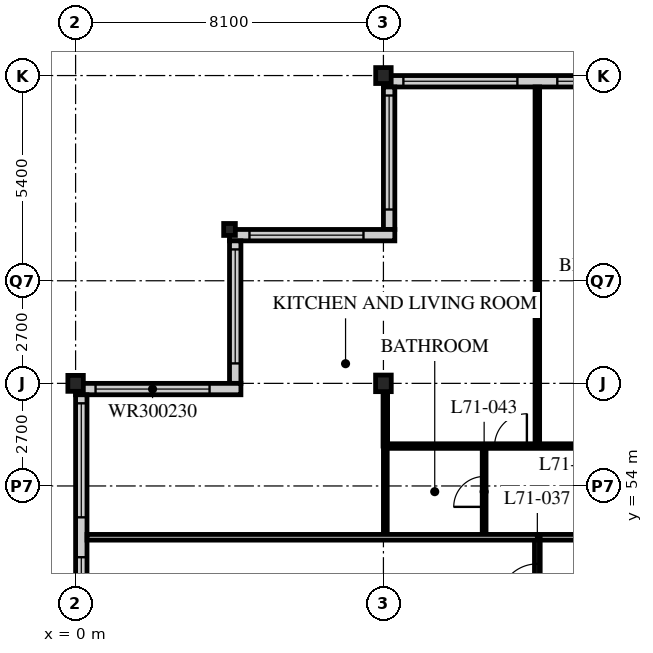
"""IFC4 building model, lengths in metres.
Left out: names, types, materials, properties, quantities, classifications, styles, units other than length and angle.
Written with IfcOpenShell. Run it as: python <this file> out.ifc"""

import sys

from ifc_helpers import new_model, si_unit, direction, frame, frame_2d, origin, origin_2d, place, context, subcontext, project, spatial, rectangle, i_section, extrude, element, fill, save


model = new_model("IFC4")
c1 = context("Model", 3, precision=1e-05, world=origin(), true_north=direction((0.0, 1.0)))
c2 = subcontext(c1, "Body", "Model", "MODEL_VIEW")
j1 = project(units=[si_unit("LENGTHUNIT", "METRE"), si_unit("PLANEANGLEUNIT", "RADIAN")], contexts=[c1])
p1 = place(None, origin())
s1 = spatial("IfcSite", under=j1, at=p1, CompositionType="ELEMENT")
p2 = place(p1, origin())
s2 = spatial("IfcBuilding", under=s1, at=p2, CompositionType="ELEMENT")
p3 = place(p2, frame((0.0, 0.0, 277.5)))
s3 = spatial("IfcBuildingStorey", under=s2, at=p3, CompositionType="ELEMENT", Elevation=277.5)
p4 = place(p3, frame((0.0, 56.7, 0.0), z_axis=(0.0, 0.0, 1.0), x_axis=(1.0, 0.0, 0.0)))
e1 = element("IfcColumn", 1, at=p4, inside=s3, PredefinedType="COLUMN", context=c2, shape_type="SweptSolid", body=[
    extrude(i_section(OverallWidth=0.407, OverallDepth=0.419, WebThickness=0.031, FlangeThickness=0.049, FilletRadius=0.015, at=origin_2d()), origin(), (0.0, 0.0, 1.0), 3.9),
])
p5 = place(p3, frame((4.05, 60.75, 0.0), z_axis=(0.0, 0.0, 1.0), x_axis=(1.0, 0.0, 0.0)))
e2 = element("IfcColumn", 2, at=p5, inside=s3, PredefinedType="COLUMN", context=c2, shape_type="SweptSolid", body=[
    extrude(i_section(OverallWidth=0.307, OverallDepth=0.314, WebThickness=0.012, FlangeThickness=0.019, FilletRadius=0.015, at=origin_2d()), origin(), (0.0, 0.0, 1.0), 3.9),
])
p6 = place(p3, frame((8.1, 56.7, 0.0), z_axis=(0.0, 0.0, 1.0), x_axis=(1.0, 0.0, 0.0)))
e3 = element("IfcColumn", 3, at=p6, inside=s3, PredefinedType="COLUMN", context=c2, shape_type="SweptSolid", body=[
    extrude(i_section(OverallWidth=0.412, OverallDepth=0.437, WebThickness=0.036, FlangeThickness=0.058, FilletRadius=0.015, at=origin_2d()), origin(), (0.0, 0.0, 1.0), 3.9),
])
p7 = place(p3, frame((8.1, 64.8, 0.0), z_axis=(0.0, 0.0, 1.0), x_axis=(1.0, 0.0, 0.0)))
e4 = element("IfcColumn", 4, at=p7, inside=s3, PredefinedType="COLUMN", context=c2, shape_type="SweptSolid", body=[
    extrude(i_section(OverallWidth=0.407, OverallDepth=0.419, WebThickness=0.031, FlangeThickness=0.049, FilletRadius=0.015, at=origin_2d()), origin(), (0.0, 0.0, 1.0), 3.9),
])
p8 = place(p3, frame((48.3, 64.65, 0.0), z_axis=(0.0, 0.0, 1.0), x_axis=(-1.0, 0.0, 0.0)))
e5 = element("IfcWall", 5, at=p8, inside=s3, PredefinedType="SOLIDWALL", context=c2, shape_type="SweptSolid", body=[
    extrude(rectangle(XDim=40.2, YDim=0.3, at=frame_2d((20.1, 0.0))), origin(), (0.0, 0.0, 1.0), 3.69),
])
p9 = place(p8, frame((0.225, 0.0, 0.6)))
e6 = element("IfcOpeningElement", 6, at=p9, cuts=e5, PredefinedType="OPENING", context=c2, shape_type="SweptSolid", body=[
    extrude(rectangle(XDim=3.0, YDim=2.4, at=frame_2d((1.5, 1.2))), frame((0.0, 0.16, 0.0), z_axis=(0.0, -1.0, 0.0), x_axis=(1.0, 0.0, 0.0)), (0.0, 0.0, 1.0), 0.32),
])
p10 = place(p8, frame((4.275, 0.0, 0.6)))
e7 = element("IfcOpeningElement", 7, at=p10, cuts=e5, PredefinedType="OPENING", context=c2, shape_type="SweptSolid", body=[
    extrude(rectangle(XDim=3.0, YDim=2.4, at=frame_2d((1.5, 1.2))), frame((0.0, 0.16, 0.0), z_axis=(0.0, -1.0, 0.0), x_axis=(1.0, 0.0, 0.0)), (0.0, 0.0, 1.0), 0.32),
])
p11 = place(p8, frame((8.325, 0.0, 0.6)))
e8 = element("IfcOpeningElement", 8, at=p11, cuts=e5, PredefinedType="OPENING", context=c2, shape_type="SweptSolid", body=[
    extrude(rectangle(XDim=3.0, YDim=2.4, at=frame_2d((1.5, 1.2))), frame((0.0, 0.16, 0.0), z_axis=(0.0, -1.0, 0.0), x_axis=(1.0, 0.0, 0.0)), (0.0, 0.0, 1.0), 0.32),
])
p12 = place(p8, frame((12.375, 0.0, 0.6)))
e9 = element("IfcOpeningElement", 9, at=p12, cuts=e5, PredefinedType="OPENING", context=c2, shape_type="SweptSolid", body=[
    extrude(rectangle(XDim=3.0, YDim=2.4, at=frame_2d((1.5, 1.2))), frame((0.0, 0.16, 0.0), z_axis=(0.0, -1.0, 0.0), x_axis=(1.0, 0.0, 0.0)), (0.0, 0.0, 1.0), 0.32),
])
p13 = place(p8, frame((16.425, 0.0, 0.6)))
e10 = element("IfcOpeningElement", 10, at=p13, cuts=e5, PredefinedType="OPENING", context=c2, shape_type="SweptSolid", body=[
    extrude(rectangle(XDim=3.0, YDim=2.4, at=frame_2d((1.5, 1.2))), frame((0.0, 0.16, 0.0), z_axis=(0.0, -1.0, 0.0), x_axis=(1.0, 0.0, 0.0)), (0.0, 0.0, 1.0), 0.32),
])
p14 = place(p8, frame((20.475, 0.0, 0.6)))
e11 = element("IfcOpeningElement", 11, at=p14, cuts=e5, PredefinedType="OPENING", context=c2, shape_type="SweptSolid", body=[
    extrude(rectangle(XDim=3.0, YDim=2.4, at=frame_2d((1.5, 1.2))), frame((0.0, 0.16, 0.0), z_axis=(0.0, -1.0, 0.0), x_axis=(1.0, 0.0, 0.0)), (0.0, 0.0, 1.0), 0.32),
])
p15 = place(p8, frame((24.525, 0.0, 0.6)))
e12 = element("IfcOpeningElement", 12, at=p15, cuts=e5, PredefinedType="OPENING", context=c2, shape_type="SweptSolid", body=[
    extrude(rectangle(XDim=3.0, YDim=2.4, at=frame_2d((1.5, 1.2))), frame((0.0, 0.16, 0.0), z_axis=(0.0, -1.0, 0.0), x_axis=(1.0, 0.0, 0.0)), (0.0, 0.0, 1.0), 0.32),
])
p16 = place(p8, frame((28.575, 0.0, 0.6)))
e13 = element("IfcOpeningElement", 13, at=p16, cuts=e5, PredefinedType="OPENING", context=c2, shape_type="SweptSolid", body=[
    extrude(rectangle(XDim=3.0, YDim=2.4, at=frame_2d((1.5, 1.2))), frame((0.0, 0.16, 0.0), z_axis=(0.0, -1.0, 0.0), x_axis=(1.0, 0.0, 0.0)), (0.0, 0.0, 1.0), 0.32),
])
p17 = place(p8, frame((32.625, 0.0, 0.6)))
e14 = element("IfcOpeningElement", 14, at=p17, cuts=e5, PredefinedType="OPENING", context=c2, shape_type="SweptSolid", body=[
    extrude(rectangle(XDim=3.0, YDim=2.4, at=frame_2d((1.5, 1.2))), frame((0.0, 0.16, 0.0), z_axis=(0.0, -1.0, 0.0), x_axis=(1.0, 0.0, 0.0)), (0.0, 0.0, 1.0), 0.32),
])
p18 = place(p8, frame((36.675, 0.0, 0.6)))
e15 = element("IfcOpeningElement", 15, at=p18, cuts=e5, PredefinedType="OPENING", context=c2, shape_type="SweptSolid", body=[
    extrude(rectangle(XDim=3.0, YDim=2.4, at=frame_2d((1.5, 1.2))), frame((0.0, 0.16, 0.0), z_axis=(0.0, -1.0, 0.0), x_axis=(1.0, 0.0, 0.0)), (0.0, 0.0, 1.0), 0.32),
])
p19 = place(p3, frame((8.25, 64.5, 0.0), z_axis=(0.0, 0.0, 1.0), x_axis=(0.0, -1.0, 0.0)))
e16 = element("IfcWall", 16, at=p19, inside=s3, PredefinedType="SOLIDWALL", context=c2, shape_type="SweptSolid", body=[
    extrude(rectangle(XDim=3.75, YDim=0.3, at=frame_2d((1.875, 0.0))), origin(), (0.0, 0.0, 1.0), 3.69),
])
p20 = place(p19, frame((0.225, 0.0, 0.6)))
e17 = element("IfcOpeningElement", 17, at=p20, cuts=e16, PredefinedType="OPENING", context=c2, shape_type="SweptSolid", body=[
    extrude(rectangle(XDim=3.0, YDim=2.3, at=frame_2d((1.5, 1.15))), frame((0.0, 0.16, 0.0), z_axis=(0.0, -1.0, 0.0), x_axis=(1.0, 0.0, 0.0)), (0.0, 0.0, 1.0), 0.32),
])
p21 = place(p3, frame((8.4, 60.6, 0.0), z_axis=(0.0, 0.0, 1.0), x_axis=(-1.0, 0.0, 0.0)))
e18 = element("IfcWall", 18, at=p21, inside=s3, PredefinedType="SOLIDWALL", context=c2, shape_type="SweptSolid", body=[
    extrude(rectangle(XDim=4.35, YDim=0.3, at=frame_2d((2.175, 0.0))), origin(), (0.0, 0.0, 1.0), 3.69),
])
p22 = place(p21, frame((0.825, 0.0, 0.6)))
e19 = element("IfcOpeningElement", 19, at=p22, cuts=e18, PredefinedType="OPENING", context=c2, shape_type="SweptSolid", body=[
    extrude(rectangle(XDim=3.0, YDim=2.3, at=frame_2d((1.5, 1.15))), frame((0.0, 0.16, 0.0), z_axis=(0.0, -1.0, 0.0), x_axis=(1.0, 0.0, 0.0)), (0.0, 0.0, 1.0), 0.32),
])
p23 = place(p3, frame((4.2, 60.45, 0.0), z_axis=(0.0, 0.0, 1.0), x_axis=(0.0, -1.0, 0.0)))
e20 = element("IfcWall", 20, at=p23, inside=s3, PredefinedType="SOLIDWALL", context=c2, shape_type="SweptSolid", body=[
    extrude(rectangle(XDim=3.75, YDim=0.3, at=frame_2d((1.875, 0.0))), origin(), (0.0, 0.0, 1.0), 3.69),
])
p24 = place(p23, frame((0.225, 0.0, 0.6)))
e21 = element("IfcOpeningElement", 21, at=p24, cuts=e20, PredefinedType="OPENING", context=c2, shape_type="SweptSolid", body=[
    extrude(rectangle(XDim=3.0, YDim=2.3, at=frame_2d((1.5, 1.15))), frame((0.0, 0.16, 0.0), z_axis=(0.0, -1.0, 0.0), x_axis=(1.0, 0.0, 0.0)), (0.0, 0.0, 1.0), 0.32),
])
p25 = place(p3, frame((4.35, 56.55, 0.0), z_axis=(0.0, 0.0, 1.0), x_axis=(-1.0, 0.0, 0.0)))
e22 = element("IfcWall", 22, at=p25, inside=s3, PredefinedType="SOLIDWALL", context=c2, shape_type="SweptSolid", body=[
    extrude(rectangle(XDim=4.35, YDim=0.3, at=frame_2d((2.175, 0.0))), origin(), (0.0, 0.0, 1.0), 3.69),
])
p26 = place(p25, frame((0.825, 0.0, 0.6)))
e23 = element("IfcOpeningElement", 23, at=p26, cuts=e22, PredefinedType="OPENING", context=c2, shape_type="SweptSolid", body=[
    extrude(rectangle(XDim=3.0, YDim=2.3, at=frame_2d((1.5, 1.15))), frame((0.0, 0.16, 0.0), z_axis=(0.0, -1.0, 0.0), x_axis=(1.0, 0.0, 0.0)), (0.0, 0.0, 1.0), 0.32),
])
p27 = place(p3, frame((0.15, 56.4, 0.0), z_axis=(0.0, 0.0, 1.0), x_axis=(0.0, -1.0, 0.0)))
e24 = element("IfcWall", 24, at=p27, inside=s3, PredefinedType="SOLIDWALL", context=c2, shape_type="SweptSolid", body=[
    extrude(rectangle(XDim=32.1, YDim=0.3, at=frame_2d((16.05, 0.0))), origin(), (0.0, 0.0, 1.0), 3.69),
])
p28 = place(p27, frame((0.225, 0.0, 0.6)))
e25 = element("IfcOpeningElement", 25, at=p28, cuts=e24, PredefinedType="OPENING", context=c2, shape_type="SweptSolid", body=[
    extrude(rectangle(XDim=3.0, YDim=2.4, at=frame_2d((1.5, 1.2))), frame((0.0, 0.16, 0.0), z_axis=(0.0, -1.0, 0.0), x_axis=(1.0, 0.0, 0.0)), (0.0, 0.0, 1.0), 0.32),
])
p29 = place(p27, frame((4.275, 0.0, 0.6)))
e26 = element("IfcOpeningElement", 26, at=p29, cuts=e24, PredefinedType="OPENING", context=c2, shape_type="SweptSolid", body=[
    extrude(rectangle(XDim=3.0, YDim=2.4, at=frame_2d((1.5, 1.2))), frame((0.0, 0.16, 0.0), z_axis=(0.0, -1.0, 0.0), x_axis=(1.0, 0.0, 0.0)), (0.0, 0.0, 1.0), 0.32),
])
p30 = place(p27, frame((8.325, 0.0, 0.6)))
e27 = element("IfcOpeningElement", 27, at=p30, cuts=e24, PredefinedType="OPENING", context=c2, shape_type="SweptSolid", body=[
    extrude(rectangle(XDim=3.0, YDim=2.4, at=frame_2d((1.5, 1.2))), frame((0.0, 0.16, 0.0), z_axis=(0.0, -1.0, 0.0), x_axis=(1.0, 0.0, 0.0)), (0.0, 0.0, 1.0), 0.32),
])
p31 = place(p27, frame((12.375, 0.0, 0.6)))
e28 = element("IfcOpeningElement", 28, at=p31, cuts=e24, PredefinedType="OPENING", context=c2, shape_type="SweptSolid", body=[
    extrude(rectangle(XDim=3.0, YDim=2.4, at=frame_2d((1.5, 1.2))), frame((0.0, 0.16, 0.0), z_axis=(0.0, -1.0, 0.0), x_axis=(1.0, 0.0, 0.0)), (0.0, 0.0, 1.0), 0.32),
])
p32 = place(p27, frame((16.425, 0.0, 0.6)))
e29 = element("IfcOpeningElement", 29, at=p32, cuts=e24, PredefinedType="OPENING", context=c2, shape_type="SweptSolid", body=[
    extrude(rectangle(XDim=3.0, YDim=2.4, at=frame_2d((1.5, 1.2))), frame((0.0, 0.16, 0.0), z_axis=(0.0, -1.0, 0.0), x_axis=(1.0, 0.0, 0.0)), (0.0, 0.0, 1.0), 0.32),
])
p33 = place(p27, frame((20.475, 0.0, 0.6)))
e30 = element("IfcOpeningElement", 30, at=p33, cuts=e24, PredefinedType="OPENING", context=c2, shape_type="SweptSolid", body=[
    extrude(rectangle(XDim=3.0, YDim=2.4, at=frame_2d((1.5, 1.2))), frame((0.0, 0.16, 0.0), z_axis=(0.0, -1.0, 0.0), x_axis=(1.0, 0.0, 0.0)), (0.0, 0.0, 1.0), 0.32),
])
p34 = place(p27, frame((24.525, 0.0, 0.6)))
e31 = element("IfcOpeningElement", 31, at=p34, cuts=e24, PredefinedType="OPENING", context=c2, shape_type="SweptSolid", body=[
    extrude(rectangle(XDim=3.0, YDim=2.4, at=frame_2d((1.5, 1.2))), frame((0.0, 0.16, 0.0), z_axis=(0.0, -1.0, 0.0), x_axis=(1.0, 0.0, 0.0)), (0.0, 0.0, 1.0), 0.32),
])
p35 = place(p27, frame((28.575, 0.0, 0.6)))
e32 = element("IfcOpeningElement", 32, at=p35, cuts=e24, PredefinedType="OPENING", context=c2, shape_type="SweptSolid", body=[
    extrude(rectangle(XDim=3.0, YDim=2.4, at=frame_2d((1.5, 1.2))), frame((0.0, 0.16, 0.0), z_axis=(0.0, -1.0, 0.0), x_axis=(1.0, 0.0, 0.0)), (0.0, 0.0, 1.0), 0.32),
])
p36 = place(p3, frame((12.15, 52.65, 0.0), z_axis=(0.0, 0.0, 1.0), x_axis=(1.0, 0.0, 0.0)))
e33 = element("IfcWall", 33, at=p36, inside=s3, PredefinedType="PARTITIONING", context=c2, shape_type="SweptSolid", body=[
    extrude(rectangle(XDim=24.3, YDim=0.15, at=frame_2d((12.15, 0.0))), origin(), (0.0, 0.0, 1.0), 3.69),
])
p37 = place(p36, frame((6.4, 0.0, 0.0)))
e34 = element("IfcOpeningElement", 34, at=p37, cuts=e33, PredefinedType="OPENING", context=c2, shape_type="SweptSolid", body=[
    extrude(rectangle(XDim=1.0, YDim=2.1, at=frame_2d((0.5, 1.05))), frame((0.0, 0.085, 0.0), z_axis=(0.0, -1.0, 0.0), x_axis=(1.0, 0.0, 0.0)), (0.0, 0.0, 1.0), 0.17),
])
p38 = place(p36, frame((8.5, 0.0, 0.0)))
e35 = element("IfcOpeningElement", 35, at=p38, cuts=e33, PredefinedType="OPENING", context=c2, shape_type="SweptSolid", body=[
    extrude(rectangle(XDim=1.0, YDim=2.1, at=frame_2d((0.5, 1.05))), frame((0.0, 0.085, 0.0), z_axis=(0.0, -1.0, 0.0), x_axis=(1.0, 0.0, 0.0)), (0.0, 0.0, 1.0), 0.17),
])
p39 = place(p36, frame((16.6, 0.0, 0.0)))
e36 = element("IfcOpeningElement", 36, at=p39, cuts=e33, PredefinedType="OPENING", context=c2, shape_type="SweptSolid", body=[
    extrude(rectangle(XDim=1.0, YDim=2.1, at=frame_2d((0.5, 1.05))), frame((0.0, 0.085, 0.0), z_axis=(0.0, -1.0, 0.0), x_axis=(1.0, 0.0, 0.0)), (0.0, 0.0, 1.0), 0.17),
])
p40 = place(p36, frame((1.525, 0.0, 0.0)))
e37 = element("IfcOpeningElement", 37, at=p40, cuts=e33, PredefinedType="OPENING", context=c2, shape_type="SweptSolid", body=[
    extrude(rectangle(XDim=1.0, YDim=2.1, at=frame_2d((0.5, 1.05))), frame((0.0, 0.085, 0.0), z_axis=(0.0, -1.0, 0.0), x_axis=(1.0, 0.0, 0.0)), (0.0, 0.0, 1.0), 0.17),
])
p41 = place(p3, frame((12.15, 22.5, 0.0), z_axis=(0.0, 0.0, 1.0), x_axis=(0.0, 1.0, 0.0)))
e38 = element("IfcWall", 38, at=p41, inside=s3, PredefinedType="PARTITIONING", context=c2, shape_type="SweptSolid", body=[
    extrude(rectangle(XDim=30.15, YDim=0.15, at=frame_2d((15.075, 0.0))), origin(), (0.0, 0.0, 1.0), 3.69),
])
p42 = place(p41, frame((0.4, 0.0, 0.0)))
e39 = element("IfcOpeningElement", 39, at=p42, cuts=e38, PredefinedType="OPENING", context=c2, shape_type="SweptSolid", body=[
    extrude(rectangle(XDim=1.0, YDim=2.1, at=frame_2d((0.5, 1.05))), frame((0.0, 0.085, 0.0), z_axis=(0.0, -1.0, 0.0), x_axis=(1.0, 0.0, 0.0)), (0.0, 0.0, 1.0), 0.17),
])
p43 = place(p41, frame((18.4, 0.0, 0.0)))
e40 = element("IfcOpeningElement", 40, at=p43, cuts=e38, PredefinedType="OPENING", context=c2, shape_type="SweptSolid", body=[
    extrude(rectangle(XDim=1.0, YDim=2.1, at=frame_2d((0.5, 1.05))), frame((0.0, 0.085, 0.0), z_axis=(0.0, -1.0, 0.0), x_axis=(1.0, 0.0, 0.0)), (0.0, 0.0, 1.0), 0.17),
])
p44 = place(p41, frame((28.45, 0.0, 0.0)))
e41 = element("IfcOpeningElement", 41, at=p44, cuts=e38, PredefinedType="OPENING", context=c2, shape_type="SweptSolid", body=[
    extrude(rectangle(XDim=1.0, YDim=2.1, at=frame_2d((0.5, 1.05))), frame((0.0, 0.085, 0.0), z_axis=(0.0, -1.0, 0.0), x_axis=(1.0, 0.0, 0.0)), (0.0, 0.0, 1.0), 0.17),
])
p45 = place(p3, frame((10.75, 52.65, 0.0), z_axis=(0.0, 0.0, 1.0), x_axis=(0.0, 1.0, 0.0)))
e42 = element("IfcWall", 42, at=p45, inside=s3, PredefinedType="PARTITIONING", context=c2, shape_type="SweptSolid", body=[
    extrude(rectangle(XDim=2.4, YDim=0.1, at=frame_2d((1.2, 0.0))), origin(), (0.0, 0.0, 1.0), 3.69),
])
p46 = place(p45, frame((0.8, 0.0, 0.0)))
e43 = element("IfcOpeningElement", 43, at=p46, cuts=e42, PredefinedType="OPENING", context=c2, shape_type="SweptSolid", body=[
    extrude(rectangle(XDim=0.8, YDim=2.1, at=frame_2d((0.4, 1.05))), frame((0.0, 0.06, 0.0), z_axis=(0.0, -1.0, 0.0), x_axis=(1.0, 0.0, 0.0)), (0.0, 0.0, 1.0), 0.12),
])
p47 = place(p3, frame((8.15, 52.65, 0.0), z_axis=(0.0, 0.0, 1.0), x_axis=(0.0, 1.0, 0.0)))
e44 = element("IfcWall", 44, at=p47, inside=s3, PredefinedType="PARTITIONING", context=c2, shape_type="SweptSolid", body=[
    extrude(rectangle(XDim=2.4, YDim=0.1, at=frame_2d((1.2, 0.0))), origin(), (0.0, 0.0, 1.0), 3.078),
])
p48 = place(p3, frame((8.15, 55.05, 0.0), z_axis=(0.0, 0.0, 1.0), x_axis=(1.0, 0.0, 0.0)))
e45 = element("IfcWall", 45, at=p48, inside=s3, PredefinedType="PARTITIONING", context=c2, shape_type="SweptSolid", body=[
    extrude(rectangle(XDim=8.05, YDim=0.12, at=frame_2d((4.025, 0.0))), origin(), (0.0, 0.0, 1.0), 3.69),
])
p49 = place(p48, frame((6.725, 0.0, 0.0)))
e46 = element("IfcOpeningElement", 46, at=p49, cuts=e45, PredefinedType="OPENING", context=c2, shape_type="SweptSolid", body=[
    extrude(rectangle(XDim=0.85, YDim=2.1, at=frame_2d((0.425, 1.05))), frame((0.0, 0.07, 0.0), z_axis=(0.0, -1.0, 0.0), x_axis=(1.0, 0.0, 0.0)), (0.0, 0.0, 1.0), 0.14),
])
p50 = place(p48, frame((2.875, 0.0, 0.0)))
e47 = element("IfcOpeningElement", 47, at=p50, cuts=e45, PredefinedType="OPENING", context=c2, shape_type="SweptSolid", body=[
    extrude(rectangle(XDim=0.85, YDim=2.1, at=frame_2d((0.425, 1.05))), frame((0.0, 0.07, 0.0), z_axis=(0.0, -1.0, 0.0), x_axis=(1.0, 0.0, 0.0)), (0.0, 0.0, 1.0), 0.14),
])
p51 = place(p3, frame((12.15, 55.05, 0.0), z_axis=(0.0, 0.0, 1.0), x_axis=(0.0, 1.0, 0.0)))
e48 = element("IfcWall", 48, at=p51, inside=s3, PredefinedType="PARTITIONING", context=c2, shape_type="SweptSolid", body=[
    extrude(rectangle(XDim=9.45, YDim=0.12, at=frame_2d((4.725, 0.0))), origin(), (0.0, 0.0, 1.0), 3.69),
])
p52 = place(p3, frame((0.3, 52.65, 0.0), z_axis=(0.0, 0.0, 1.0), x_axis=(1.0, 0.0, 0.0)))
e49 = element("IfcWall", 49, at=p52, inside=s3, PredefinedType="PARTITIONING", context=c2, shape_type="SweptSolid", body=[
    extrude(rectangle(XDim=11.85, YDim=0.15, at=frame_2d((5.925, 0.0))), origin(), (0.0, 0.0, 1.0), 3.69),
])
p53 = place(p3, frame((8.15, 55.05, 0.0), z_axis=(0.0, 0.0, 1.0), x_axis=(0.0, 1.0, 0.0)))
e50 = element("IfcWall", 50, at=p53, inside=s3, PredefinedType="PARTITIONING", context=c2, shape_type="SweptSolid", body=[
    extrude(rectangle(XDim=1.447, YDim=0.12, at=frame_2d((0.724, 0.0))), origin(), (0.0, 0.0, 1.0), 3.078),
])
p54 = place(p17, origin())
e51 = element("IfcWindow", 51, at=p54, inside=s3, PartitioningType="SINGLE_PANEL", PredefinedType="WINDOW", context=c2, shape_type="SweptSolid", body=[
    extrude(rectangle(XDim=3.0, YDim=2.4, at=frame_2d((1.5, 1.2))), frame((0.0, 0.03, 0.0), z_axis=(0.0, -1.0, 0.0), x_axis=(1.0, 0.0, 0.0)), (0.0, 0.0, 1.0), 0.06),
])
fill(e14, e51)
p55 = place(p18, origin())
e52 = element("IfcWindow", 52, at=p55, inside=s3, PartitioningType="SINGLE_PANEL", PredefinedType="WINDOW", context=c2, shape_type="SweptSolid", body=[
    extrude(rectangle(XDim=3.0, YDim=2.4, at=frame_2d((1.5, 1.2))), frame((0.0, 0.03, 0.0), z_axis=(0.0, -1.0, 0.0), x_axis=(1.0, 0.0, 0.0)), (0.0, 0.0, 1.0), 0.06),
])
fill(e15, e52)
p56 = place(p20, origin())
e53 = element("IfcWindow", 53, at=p56, inside=s3, PartitioningType="SINGLE_PANEL", PredefinedType="WINDOW", context=c2, shape_type="SweptSolid", body=[
    extrude(rectangle(XDim=3.0, YDim=2.3, at=frame_2d((1.5, 1.15))), frame((0.0, 0.03, 0.0), z_axis=(0.0, -1.0, 0.0), x_axis=(1.0, 0.0, 0.0)), (0.0, 0.0, 1.0), 0.06),
])
fill(e17, e53)
p57 = place(p22, origin())
e54 = element("IfcWindow", 54, at=p57, inside=s3, PartitioningType="SINGLE_PANEL", PredefinedType="WINDOW", context=c2, shape_type="SweptSolid", body=[
    extrude(rectangle(XDim=3.0, YDim=2.3, at=frame_2d((1.5, 1.15))), frame((0.0, 0.03, 0.0), z_axis=(0.0, -1.0, 0.0), x_axis=(1.0, 0.0, 0.0)), (0.0, 0.0, 1.0), 0.06),
])
fill(e19, e54)
p58 = place(p24, origin())
e55 = element("IfcWindow", 55, at=p58, inside=s3, PartitioningType="SINGLE_PANEL", PredefinedType="WINDOW", context=c2, shape_type="SweptSolid", body=[
    extrude(rectangle(XDim=3.0, YDim=2.3, at=frame_2d((1.5, 1.15))), frame((0.0, 0.03, 0.0), z_axis=(0.0, -1.0, 0.0), x_axis=(1.0, 0.0, 0.0)), (0.0, 0.0, 1.0), 0.06),
])
fill(e21, e55)
p59 = place(p26, origin())
e56 = element("IfcWindow", 56, at=p59, inside=s3, PartitioningType="SINGLE_PANEL", PredefinedType="WINDOW", context=c2, shape_type="SweptSolid", body=[
    extrude(rectangle(XDim=3.0, YDim=2.3, at=frame_2d((1.5, 1.15))), frame((0.0, 0.03, 0.0), z_axis=(0.0, -1.0, 0.0), x_axis=(1.0, 0.0, 0.0)), (0.0, 0.0, 1.0), 0.06),
])
fill(e23, e56)
p60 = place(p28, origin())
e57 = element("IfcWindow", 57, at=p60, inside=s3, PartitioningType="SINGLE_PANEL", PredefinedType="WINDOW", context=c2, shape_type="SweptSolid", body=[
    extrude(rectangle(XDim=3.0, YDim=2.4, at=frame_2d((1.5, 1.2))), frame((0.0, 0.03, 0.0), z_axis=(0.0, -1.0, 0.0), x_axis=(1.0, 0.0, 0.0)), (0.0, 0.0, 1.0), 0.06),
])
fill(e25, e57)
p61 = place(p29, origin())
e58 = element("IfcWindow", 58, at=p61, inside=s3, PartitioningType="SINGLE_PANEL", PredefinedType="WINDOW", context=c2, shape_type="SweptSolid", body=[
    extrude(rectangle(XDim=3.0, YDim=2.4, at=frame_2d((1.5, 1.2))), frame((0.0, 0.03, 0.0), z_axis=(0.0, -1.0, 0.0), x_axis=(1.0, 0.0, 0.0)), (0.0, 0.0, 1.0), 0.06),
])
fill(e26, e58)
p62 = place(p44, origin())
e59 = element("IfcDoor", 59, at=p62, inside=s3, OperationType="SINGLE_SWING_LEFT", PredefinedType="DOOR", context=c2, shape_type="SweptSolid", body=[
    extrude(rectangle(XDim=1.0, YDim=2.1, at=frame_2d((0.5, 1.05))), frame((0.0, 0.025, 0.0), z_axis=(0.0, -1.0, 0.0), x_axis=(1.0, 0.0, 0.0)), (0.0, 0.0, 1.0), 0.05),
])
fill(e41, e59)
p63 = place(p46, origin())
e60 = element("IfcDoor", 60, at=p63, inside=s3, OperationType="SINGLE_SWING_LEFT", PredefinedType="DOOR", context=c2, shape_type="SweptSolid", body=[
    extrude(rectangle(XDim=0.8, YDim=2.1, at=frame_2d((0.4, 1.05))), frame((0.0, 0.025, 0.0), z_axis=(0.0, -1.0, 0.0), x_axis=(1.0, 0.0, 0.0)), (0.0, 0.0, 1.0), 0.05),
])
fill(e43, e60)
p64 = place(p50, origin())
e61 = element("IfcDoor", 61, at=p64, inside=s3, OperationType="SINGLE_SWING_RIGHT", PredefinedType="DOOR", context=c2, shape_type="SweptSolid", body=[
    extrude(rectangle(XDim=0.85, YDim=2.1, at=frame_2d((0.425, 1.05))), frame((0.0, 0.025, 0.0), z_axis=(0.0, -1.0, 0.0), x_axis=(1.0, 0.0, 0.0)), (0.0, 0.0, 1.0), 0.05),
])
fill(e47, e61)
save(model, sys.argv[1])
